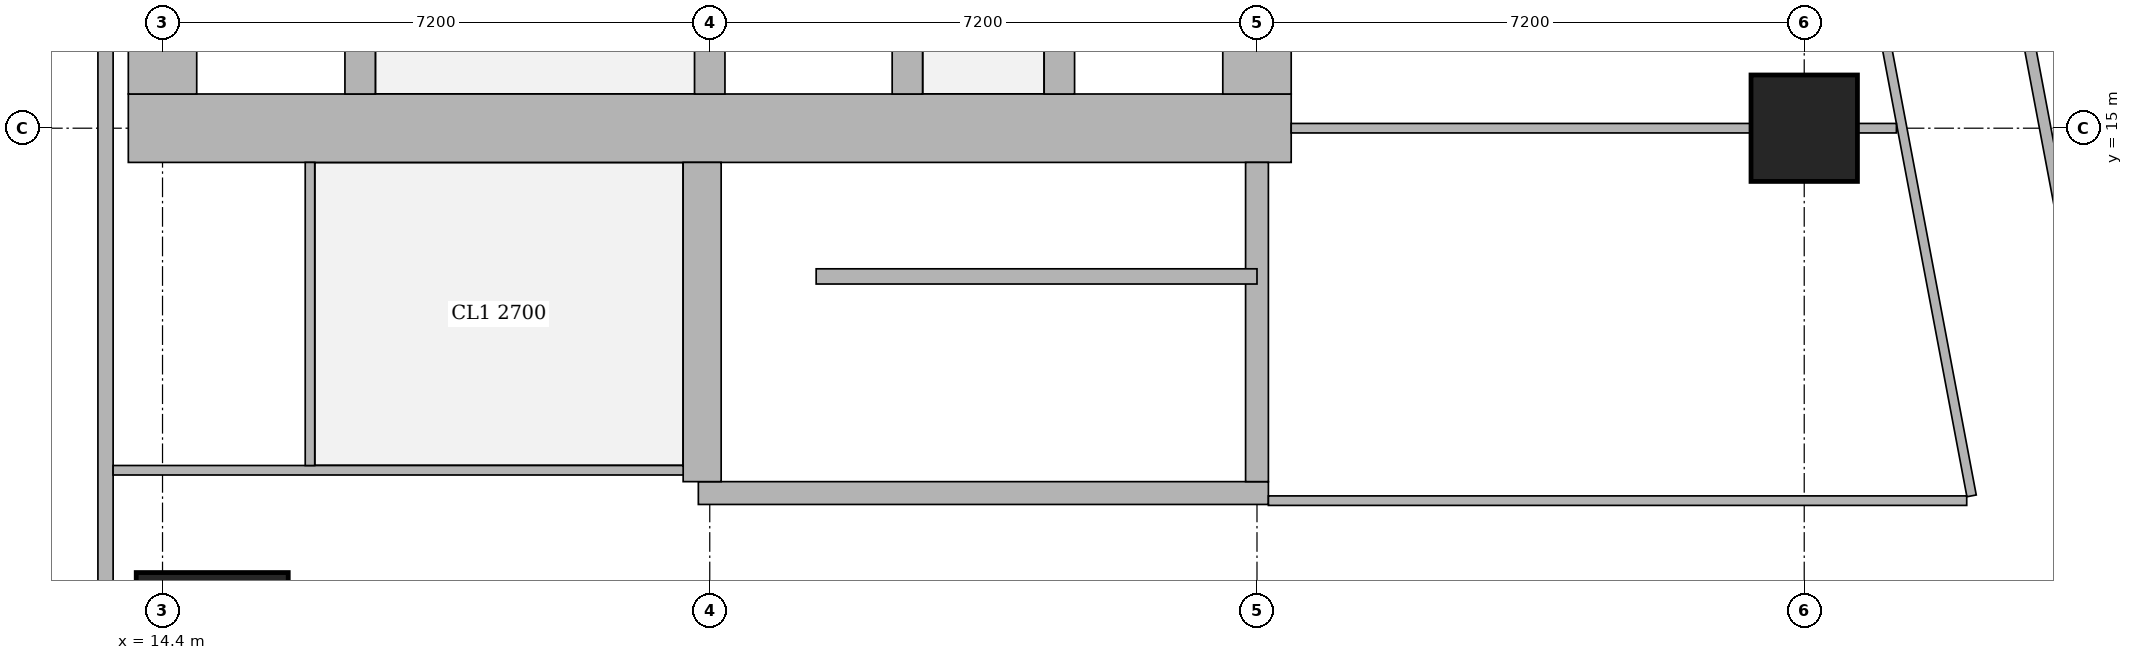
"""IFC4 building model, lengths in metres.
Left out: names, types, materials, properties, quantities, classifications, styles, units other than length and angle.
Written with IfcOpenShell. Run it as: python <this file> out.ifc"""

import sys

from ifc_helpers import new_model, si_unit, direction, frame, frame_2d, origin, origin_2d, place, context, subcontext, project, spatial, rectangle, extrude, element, fill, save


model = new_model("IFC4")
c1 = context("Model", 3, precision=1e-05, world=origin(), true_north=direction((0.0, 1.0)))
c2 = subcontext(c1, "Body", "Model", "MODEL_VIEW")
j1 = project(units=[si_unit("LENGTHUNIT", "METRE"), si_unit("PLANEANGLEUNIT", "RADIAN")], contexts=[c1])
p1 = place(None, origin())
s1 = spatial("IfcSite", under=j1, at=p1, CompositionType="ELEMENT")
p2 = place(p1, origin())
s2 = spatial("IfcBuilding", under=s1, at=p2, CompositionType="ELEMENT")
p3 = place(p2, frame((0.0, 0.0, 262.85)))
s3 = spatial("IfcBuildingStorey", under=s2, at=p3, CompositionType="ELEMENT", Elevation=262.85)
p4 = place(p3, frame((15.054, 8.154, 0.0), z_axis=(0.0, 0.0, 1.0), x_axis=(1.0, 0.0, 0.0)))
e1 = element("IfcColumn", 1, at=p4, inside=s3, PredefinedType="COLUMN", context=c2, shape_type="SweptSolid", body=[
    extrude(rectangle(XDim=2.0, YDim=2.0, at=origin_2d()), origin(), (0.0, 0.0, 1.0), 3.75),
])
p5 = place(p3, frame((36.0, 15.0, 0.0), z_axis=(0.0, 0.0, 1.0), x_axis=(1.0, 0.0, 0.0)))
e2 = element("IfcColumn", 2, at=p5, inside=s3, PredefinedType="COLUMN", context=c2, shape_type="SweptSolid", body=[
    extrude(rectangle(XDim=1.4, YDim=1.4, at=origin_2d()), origin(), (0.0, 0.0, 1.0), 3.75),
])
p6 = place(p3, frame((13.95, 15.0, 0.0), z_axis=(0.0, 0.0, 1.0), x_axis=(1.0, 0.0, 0.0)))
e3 = element("IfcWall", 3, at=p6, inside=s3, PredefinedType="SHEAR", context=c2, shape_type="SweptSolid", body=[
    extrude(rectangle(XDim=15.3, YDim=0.9, at=frame_2d((7.65, 0.0))), origin(), (0.0, 0.0, 1.0), 3.75),
])
p7 = place(p6, frame((4.45, 0.0, 0.0)))
e4 = element("IfcOpeningElement", 4, at=p7, cuts=e3, PredefinedType="OPENING", context=c2, shape_type="SweptSolid", body=[
    extrude(rectangle(XDim=1.8, YDim=2.1, at=frame_2d((0.9, 1.05))), frame((0.0, 0.46, 0.0), z_axis=(0.0, -1.0, 0.0), x_axis=(1.0, 0.0, 0.0)), (0.0, 0.0, 1.0), 0.92),
])
p8 = place(p6, frame((10.7, 0.0, 0.0)))
e5 = element("IfcOpeningElement", 5, at=p8, cuts=e3, PredefinedType="OPENING", context=c2, shape_type="SweptSolid", body=[
    extrude(rectangle(XDim=1.1, YDim=2.1, at=frame_2d((0.55, 1.05))), frame((0.0, 0.46, 0.0), z_axis=(0.0, -1.0, 0.0), x_axis=(1.0, 0.0, 0.0)), (0.0, 0.0, 1.0), 0.92),
])
for number, where, z_axis, x_axis in (
    (6, (14.4, 15.45, 0.0), (0.0, 0.0, 1.0), (0.0, 1.0, 0.0)),
    (7, (28.8, 15.45, 0.0), (0.0, 0.0, 1.0), (0.0, 1.0, 0.0)),
):
    element("IfcWall", number, at=place(p3, frame(where, z_axis=z_axis, x_axis=x_axis)), inside=s3, PredefinedType="SHEAR", context=c2, shape_type="SweptSolid", body=[
        extrude(rectangle(XDim=14.1, YDim=0.9, at=frame_2d((7.05, 0.0))), origin(), (0.0, 0.0, 1.0), 3.75),
    ])
p9 = place(p3, frame((17.0, 15.45, 0.0), z_axis=(0.0, 0.0, 1.0), x_axis=(0.0, 1.0, 0.0)))
e8 = element("IfcWall", 8, at=p9, inside=s3, PredefinedType="SHEAR", context=c2, shape_type="SweptSolid", body=[
    extrude(rectangle(XDim=14.1, YDim=0.4, at=frame_2d((7.05, 0.0))), origin(), (0.0, 0.0, 1.0), 3.75),
])
p10 = place(p9, frame((1.05, 0.0, 0.0)))
e9 = element("IfcOpeningElement", 9, at=p10, cuts=e8, PredefinedType="OPENING", context=c2, shape_type="SweptSolid", body=[
    extrude(rectangle(XDim=1.0, YDim=2.1, at=frame_2d((0.5, 1.05))), frame((0.0, 0.21, 0.0), z_axis=(0.0, -1.0, 0.0), x_axis=(1.0, 0.0, 0.0)), (0.0, 0.0, 1.0), 0.42),
])
p11 = place(p9, frame((4.675, 0.0, 0.0)))
e10 = element("IfcOpeningElement", 10, at=p11, cuts=e8, PredefinedType="OPENING", context=c2, shape_type="SweptSolid", body=[
    extrude(rectangle(XDim=1.0, YDim=2.1, at=frame_2d((0.5, 1.05))), frame((0.0, 0.21, 0.0), z_axis=(0.0, -1.0, 0.0), x_axis=(1.0, 0.0, 0.0)), (0.0, 0.0, 1.0), 0.42),
])
p12 = place(p9, frame((8.425, 0.0, 0.0)))
e11 = element("IfcOpeningElement", 11, at=p12, cuts=e8, PredefinedType="OPENING", context=c2, shape_type="SweptSolid", body=[
    extrude(rectangle(XDim=1.0, YDim=2.1, at=frame_2d((0.5, 1.05))), frame((0.0, 0.21, 0.0), z_axis=(0.0, -1.0, 0.0), x_axis=(1.0, 0.0, 0.0)), (0.0, 0.0, 1.0), 0.42),
])
p13 = place(p9, frame((12.175, 0.0, 0.0)))
e12 = element("IfcOpeningElement", 12, at=p13, cuts=e8, PredefinedType="OPENING", context=c2, shape_type="SweptSolid", body=[
    extrude(rectangle(XDim=1.0, YDim=2.1, at=frame_2d((0.5, 1.05))), frame((0.0, 0.21, 0.0), z_axis=(0.0, -1.0, 0.0), x_axis=(1.0, 0.0, 0.0)), (0.0, 0.0, 1.0), 0.42),
])
p14 = place(p3, frame((21.6, 15.45, 0.0), z_axis=(0.0, 0.0, 1.0), x_axis=(0.0, 1.0, 0.0)))
e13 = element("IfcWall", 13, at=p14, inside=s3, PredefinedType="SHEAR", context=c2, shape_type="SweptSolid", body=[
    extrude(rectangle(XDim=14.1, YDim=0.4, at=frame_2d((7.05, 0.0))), origin(), (0.0, 0.0, 1.0), 3.75),
])
p15 = place(p14, frame((0.875, 0.0, 0.0)))
e14 = element("IfcOpeningElement", 14, at=p15, cuts=e13, PredefinedType="OPENING", context=c2, shape_type="SweptSolid", body=[
    extrude(rectangle(XDim=1.1, YDim=2.1, at=frame_2d((0.55, 1.05))), frame((0.0, 0.21, 0.0), z_axis=(0.0, -1.0, 0.0), x_axis=(1.0, 0.0, 0.0)), (0.0, 0.0, 1.0), 0.42),
])
p16 = place(p14, frame((4.625, 0.0, 0.0)))
e15 = element("IfcOpeningElement", 15, at=p16, cuts=e13, PredefinedType="OPENING", context=c2, shape_type="SweptSolid", body=[
    extrude(rectangle(XDim=1.1, YDim=2.1, at=frame_2d((0.55, 1.05))), frame((0.0, 0.21, 0.0), z_axis=(0.0, -1.0, 0.0), x_axis=(1.0, 0.0, 0.0)), (0.0, 0.0, 1.0), 0.42),
])
p17 = place(p14, frame((8.375, 0.0, 0.0)))
e16 = element("IfcOpeningElement", 16, at=p17, cuts=e13, PredefinedType="OPENING", context=c2, shape_type="SweptSolid", body=[
    extrude(rectangle(XDim=1.1, YDim=2.1, at=frame_2d((0.55, 1.05))), frame((0.0, 0.21, 0.0), z_axis=(0.0, -1.0, 0.0), x_axis=(1.0, 0.0, 0.0)), (0.0, 0.0, 1.0), 0.42),
])
p18 = place(p14, frame((12.125, 0.0, 0.0)))
e17 = element("IfcOpeningElement", 17, at=p18, cuts=e13, PredefinedType="OPENING", context=c2, shape_type="SweptSolid", body=[
    extrude(rectangle(XDim=1.1, YDim=2.1, at=frame_2d((0.55, 1.05))), frame((0.0, 0.21, 0.0), z_axis=(0.0, -1.0, 0.0), x_axis=(1.0, 0.0, 0.0)), (0.0, 0.0, 1.0), 0.42),
])
p19 = place(p3, frame((24.2, 15.45, 0.0), z_axis=(0.0, 0.0, 1.0), x_axis=(0.0, 1.0, 0.0)))
e18 = element("IfcWall", 18, at=p19, inside=s3, PredefinedType="SHEAR", context=c2, shape_type="SweptSolid", body=[
    extrude(rectangle(XDim=14.1, YDim=0.4, at=frame_2d((7.05, 0.0))), origin(), (0.0, 0.0, 1.0), 3.75),
])
p20 = place(p3, frame((26.2, 15.45, 0.0), z_axis=(0.0, 0.0, 1.0), x_axis=(0.0, 1.0, 0.0)))
e19 = element("IfcWall", 19, at=p20, inside=s3, PredefinedType="SHEAR", context=c2, shape_type="SweptSolid", body=[
    extrude(rectangle(XDim=3.1, YDim=0.4, at=frame_2d((1.55, 0.0))), origin(), (0.0, 0.0, 1.0), 3.75),
])
p21 = place(p20, frame((0.825, 0.0, 0.0)))
e20 = element("IfcOpeningElement", 20, at=p21, cuts=e19, PredefinedType="OPENING", context=c2, shape_type="SweptSolid", body=[
    extrude(rectangle(XDim=1.2, YDim=2.1, at=frame_2d((0.6, 1.05))), frame((0.0, 0.21, 0.0), z_axis=(0.0, -1.0, 0.0), x_axis=(1.0, 0.0, 0.0)), (0.0, 0.0, 1.0), 0.42),
])
p22 = place(p3, frame((21.45, 10.2, 0.0), z_axis=(0.0, 0.0, 1.0), x_axis=(1.0, 0.0, 0.0)))
e21 = element("IfcWall", 21, at=p22, inside=s3, PredefinedType="SHEAR", context=c2, shape_type="SweptSolid", body=[
    extrude(rectangle(XDim=7.5, YDim=0.3, at=frame_2d((3.75, 0.0))), origin(), (0.0, 0.0, 1.0), 3.75),
])
p23 = place(p22, frame((1.2, 0.0, 0.0)))
e22 = element("IfcOpeningElement", 22, at=p23, cuts=e21, PredefinedType="OPENING", context=c2, shape_type="SweptSolid", body=[
    extrude(rectangle(XDim=1.1, YDim=2.1, at=frame_2d((0.55, 1.05))), frame((0.0, 0.16, 0.0), z_axis=(0.0, -1.0, 0.0), x_axis=(1.0, 0.0, 0.0)), (0.0, 0.0, 1.0), 0.32),
])
p24 = place(p3, frame((21.5, 10.35, 0.0), z_axis=(0.0, 0.0, 1.0), x_axis=(0.0, 1.0, 0.0)))
e23 = element("IfcWall", 23, at=p24, inside=s3, PredefinedType="SHEAR", context=c2, shape_type="SweptSolid", body=[
    extrude(rectangle(XDim=4.2, YDim=0.5, at=frame_2d((2.1, 0.0))), origin(), (0.0, 0.0, 1.0), 3.75),
])
p25 = place(p3, frame((28.8, 10.35, 0.0), z_axis=(0.0, 0.0, 1.0), x_axis=(0.0, 1.0, 0.0)))
e24 = element("IfcWall", 24, at=p25, inside=s3, PredefinedType="SHEAR", context=c2, shape_type="SweptSolid", body=[
    extrude(rectangle(XDim=4.2, YDim=0.3, at=frame_2d((2.1, 0.0))), origin(), (0.0, 0.0, 1.0), 3.75),
])
p26 = place(p3, frame((13.65, 43.037, 0.0), z_axis=(0.0, 0.0, 1.0), x_axis=(0.0, -1.0, 0.0)))
e25 = element("IfcWall", 25, at=p26, inside=s3, PredefinedType="SOLIDWALL", context=c2, shape_type="SweptSolid", body=[
    extrude(rectangle(XDim=35.374, YDim=0.2, at=frame_2d((17.687, 0.0))), origin(), (0.0, 0.0, 1.0), 3.5),
])
p27 = place(p26, frame((1.959, 0.0, 0.9)))
e26 = element("IfcOpeningElement", 26, at=p27, cuts=e25, PredefinedType="OPENING", context=c2, shape_type="SweptSolid", body=[
    extrude(rectangle(XDim=1.8, YDim=1.5, at=frame_2d((0.9, 0.75))), frame((0.0, 0.11, 0.0), z_axis=(0.0, -1.0, 0.0), x_axis=(1.0, 0.0, 0.0)), (0.0, 0.0, 1.0), 0.22),
])
p28 = place(p3, frame((34.036, 42.186, 0.0), z_axis=(0.0, 0.0, 1.0), x_axis=(0.185593518645, -0.9826266055, 0.0)))
e27 = element("IfcWall", 27, at=p28, inside=s3, PredefinedType="SOLIDWALL", context=c2, shape_type="SweptSolid", body=[
    extrude(rectangle(XDim=35.961, YDim=0.15, at=frame_2d((17.98, 0.0))), origin(), (0.0, 0.0, 1.0), 2.5),
])
p29 = place(p28, frame((15.529, 0.0, 0.0)))
e28 = element("IfcOpeningElement", 28, at=p29, cuts=e27, PredefinedType="OPENING", context=c2, shape_type="SweptSolid", body=[
    extrude(rectangle(XDim=1.0, YDim=2.1, at=frame_2d((0.5, 1.05))), frame((0.0, 0.085, 0.0), z_axis=(0.0, -1.0, 0.0), x_axis=(1.0, 0.0, 0.0)), (0.0, 0.0, 1.0), 0.17),
])
p30 = place(p28, frame((19.345, 0.0, 0.0)))
e29 = element("IfcOpeningElement", 29, at=p30, cuts=e27, PredefinedType="OPENING", context=c2, shape_type="SweptSolid", body=[
    extrude(rectangle(XDim=1.0, YDim=2.1, at=frame_2d((0.5, 1.05))), frame((0.0, 0.085, 0.0), z_axis=(0.0, -1.0, 0.0), x_axis=(1.0, 0.0, 0.0)), (0.0, 0.0, 1.0), 0.17),
])
p31 = place(p28, frame((30.594, 0.0, 0.0)))
e30 = element("IfcOpeningElement", 30, at=p31, cuts=e27, PredefinedType="OPENING", context=c2, shape_type="SweptSolid", body=[
    extrude(rectangle(XDim=1.0, YDim=2.1, at=frame_2d((0.5, 1.05))), frame((0.0, 0.085, 0.0), z_axis=(0.0, -1.0, 0.0), x_axis=(1.0, 0.0, 0.0)), (0.0, 0.0, 1.0), 0.17),
])
p32 = place(p3, frame((13.75, 10.5, 0.0), z_axis=(0.0, 0.0, 1.0), x_axis=(1.0, 0.0, 0.0)))
e31 = element("IfcWall", 31, at=p32, inside=s3, PredefinedType="PARTITIONING", context=c2, shape_type="SweptSolid", body=[
    extrude(rectangle(XDim=7.5, YDim=0.125, at=frame_2d((3.75, 0.0))), origin(), (0.0, 0.0, 1.0), 3.5),
])
p33 = place(p32, frame((4.245, 0.0, 0.0)))
e32 = element("IfcOpeningElement", 32, at=p33, cuts=e31, PredefinedType="OPENING", context=c2, shape_type="SweptSolid", body=[
    extrude(rectangle(XDim=1.8, YDim=2.1, at=frame_2d((0.9, 1.05))), frame((0.0, 0.073, 0.0), z_axis=(0.0, -1.0, 0.0), x_axis=(1.0, 0.0, 0.0)), (0.0, 0.0, 1.0), 0.145),
])
p34 = place(p3, frame((16.34, 10.562, 0.0), z_axis=(0.0, 0.0, 1.0), x_axis=(0.0, 1.0, 0.0)))
e33 = element("IfcWall", 33, at=p34, inside=s3, PredefinedType="PARTITIONING", context=c2, shape_type="SweptSolid", body=[
    extrude(rectangle(XDim=3.988, YDim=0.125, at=frame_2d((1.994, 0.0))), origin(), (0.0, 0.0, 1.0), 3.5),
])
p35 = place(p34, frame((1.438, 0.0, 0.0)))
e34 = element("IfcOpeningElement", 34, at=p35, cuts=e33, PredefinedType="OPENING", context=c2, shape_type="SweptSolid", body=[
    extrude(rectangle(XDim=1.0, YDim=2.1, at=frame_2d((0.5, 1.05))), frame((0.0, 0.073, 0.0), z_axis=(0.0, -1.0, 0.0), x_axis=(1.0, 0.0, 0.0)), (0.0, 0.0, 1.0), 0.145),
])
p36 = place(p3, frame((28.95, 10.1, 0.0), z_axis=(0.0, 0.0, 1.0), x_axis=(1.0, 0.0, 0.0)))
e35 = element("IfcWall", 35, at=p36, inside=s3, PredefinedType="PARTITIONING", context=c2, shape_type="SweptSolid", body=[
    extrude(rectangle(XDim=9.188, YDim=0.125, at=frame_2d((4.594, 0.0))), origin(), (0.0, 0.0, 1.0), 3.5),
])
p37 = place(p3, frame((38.202, 10.163, 0.0), z_axis=(0.0, 0.0, 1.0), x_axis=(-0.185610321132, 0.982623431783, 0.0)))
e36 = element("IfcWall", 36, at=p37, inside=s3, PredefinedType="PARTITIONING", context=c2, shape_type="SweptSolid", body=[
    extrude(rectangle(XDim=25.111, YDim=0.125, at=frame_2d((12.556, 0.0))), origin(), (0.0, 0.0, 1.0), 2.5),
])
p38 = place(p37, frame((0.708, 0.0, 0.0)))
e37 = element("IfcOpeningElement", 37, at=p38, cuts=e36, PredefinedType="OPENING", context=c2, shape_type="SweptSolid", body=[
    extrude(rectangle(XDim=1.0, YDim=2.1, at=frame_2d((0.5, 1.05))), frame((0.0, 0.073, 0.0), z_axis=(0.0, -1.0, 0.0), x_axis=(1.0, 0.0, 0.0)), (0.0, 0.0, 1.0), 0.145),
])
p39 = place(p37, frame((5.9, 0.0, 0.0)))
e38 = element("IfcOpeningElement", 38, at=p39, cuts=e36, PredefinedType="OPENING", context=c2, shape_type="SweptSolid", body=[
    extrude(rectangle(XDim=1.0, YDim=2.1, at=frame_2d((0.5, 1.05))), frame((0.0, 0.073, 0.0), z_axis=(0.0, -1.0, 0.0), x_axis=(1.0, 0.0, 0.0)), (0.0, 0.0, 1.0), 0.145),
])
p40 = place(p37, frame((13.378, 0.0, 0.0)))
e39 = element("IfcOpeningElement", 39, at=p40, cuts=e36, PredefinedType="OPENING", context=c2, shape_type="SweptSolid", body=[
    extrude(rectangle(XDim=1.0, YDim=2.1, at=frame_2d((0.5, 1.05))), frame((0.0, 0.073, 0.0), z_axis=(0.0, -1.0, 0.0), x_axis=(1.0, 0.0, 0.0)), (0.0, 0.0, 1.0), 0.145),
])
p41 = place(p37, frame((17.194, 0.0, 0.0)))
e40 = element("IfcOpeningElement", 40, at=p41, cuts=e36, PredefinedType="OPENING", context=c2, shape_type="SweptSolid", body=[
    extrude(rectangle(XDim=1.0, YDim=2.1, at=frame_2d((0.5, 1.05))), frame((0.0, 0.073, 0.0), z_axis=(0.0, -1.0, 0.0), x_axis=(1.0, 0.0, 0.0)), (0.0, 0.0, 1.0), 0.145),
])
p42 = place(p37, frame((21.15, 0.0, 0.0)))
e41 = element("IfcOpeningElement", 41, at=p42, cuts=e36, PredefinedType="OPENING", context=c2, shape_type="SweptSolid", body=[
    extrude(rectangle(XDim=1.0, YDim=2.1, at=frame_2d((0.5, 1.05))), frame((0.0, 0.073, 0.0), z_axis=(0.0, -1.0, 0.0), x_axis=(1.0, 0.0, 0.0)), (0.0, 0.0, 1.0), 0.145),
])
p43 = place(p3, frame((29.25, 15.0, 0.0), z_axis=(0.0, 0.0, 1.0), x_axis=(1.0, 0.0, 0.0)))
e42 = element("IfcWall", 42, at=p43, inside=s3, PredefinedType="PARTITIONING", context=c2, shape_type="SweptSolid", body=[
    extrude(rectangle(XDim=6.049, YDim=0.125, at=frame_2d((3.024, 0.0))), origin(), (0.0, 0.0, 1.0), 3.5),
])
p44 = place(p3, frame((36.701, 15.0, 0.0), z_axis=(0.0, 0.0, 1.0), x_axis=(1.0, 0.0, 0.0)))
e43 = element("IfcWall", 43, at=p44, inside=s3, PredefinedType="PARTITIONING", context=c2, shape_type="SweptSolid", body=[
    extrude(rectangle(XDim=0.512, YDim=0.125, at=frame_2d((0.256, 0.0))), origin(), (0.0, 0.0, 1.0), 3.5),
])
p45 = place(p3, frame((23.0, 13.05, 0.0), z_axis=(0.0, 0.0, 1.0), x_axis=(1.0, 0.0, 0.0)))
e44 = element("IfcWall", 44, at=p45, inside=s3, PredefinedType="SHEAR", context=c2, shape_type="SweptSolid", body=[
    extrude(rectangle(XDim=5.8, YDim=0.2, at=frame_2d((2.9, 0.0))), origin(), (0.0, 0.0, 1.0), 3.75),
])
p46 = place(p35, origin())
e45 = element("IfcDoor", 45, at=p46, inside=s3, OperationType="SINGLE_SWING_LEFT", PredefinedType="DOOR", context=c2, shape_type="SweptSolid", body=[
    extrude(rectangle(XDim=1.0, YDim=2.1, at=frame_2d((0.5, 1.05))), frame((0.0, 0.025, 0.0), z_axis=(0.0, -1.0, 0.0), x_axis=(1.0, 0.0, 0.0)), (0.0, 0.0, 1.0), 0.05),
])
fill(e34, e45)
p47 = place(p33, origin())
e46 = element("IfcDoor", 46, at=p47, inside=s3, OperationType="DOUBLE_DOOR_SINGLE_SWING", PredefinedType="DOOR", context=c2, shape_type="SweptSolid", body=[
    extrude(rectangle(XDim=1.8, YDim=2.1, at=frame_2d((0.9, 1.05))), frame((0.0, 0.025, 0.0), z_axis=(0.0, -1.0, 0.0), x_axis=(1.0, 0.0, 0.0)), (0.0, 0.0, 1.0), 0.05),
])
fill(e32, e46)
p48 = place(p38, origin())
e47 = element("IfcDoor", 47, at=p48, inside=s3, OperationType="SINGLE_SWING_LEFT", PredefinedType="DOOR", context=c2, shape_type="SweptSolid", body=[
    extrude(rectangle(XDim=1.0, YDim=2.1, at=frame_2d((0.5, 1.05))), frame((0.0, 0.025, 0.0), z_axis=(0.0, -1.0, 0.0), x_axis=(1.0, 0.0, 0.0)), (0.0, 0.0, 1.0), 0.05),
])
fill(e37, e47)
p49 = place(p39, origin())
e48 = element("IfcDoor", 48, at=p49, inside=s3, OperationType="SINGLE_SWING_LEFT", PredefinedType="DOOR", context=c2, shape_type="SweptSolid", body=[
    extrude(rectangle(XDim=1.0, YDim=2.1, at=frame_2d((0.5, 1.05))), frame((0.0, 0.025, 0.0), z_axis=(0.0, -1.0, 0.0), x_axis=(1.0, 0.0, 0.0)), (0.0, 0.0, 1.0), 0.05),
])
fill(e38, e48)
p50 = place(p7, origin())
e49 = element("IfcDoor", 49, at=p50, inside=s3, OperationType="DOUBLE_DOOR_SINGLE_SWING", PredefinedType="DOOR", context=c2, shape_type="SweptSolid", body=[
    extrude(rectangle(XDim=1.8, YDim=2.1, at=frame_2d((0.9, 1.05))), frame((0.0, 0.025, 0.0), z_axis=(0.0, -1.0, 0.0), x_axis=(1.0, 0.0, 0.0)), (0.0, 0.0, 1.0), 0.05),
])
fill(e4, e49)
p51 = place(p8, origin())
e50 = element("IfcDoor", 50, at=p51, inside=s3, OperationType="SINGLE_SWING_LEFT", PredefinedType="DOOR", context=c2, shape_type="SweptSolid", body=[
    extrude(rectangle(XDim=1.1, YDim=2.1, at=frame_2d((0.55, 1.05))), frame((0.0, 0.025, 0.0), z_axis=(0.0, -1.0, 0.0), x_axis=(1.0, 0.0, 0.0)), (0.0, 0.0, 1.0), 0.05),
])
fill(e5, e50)
p52 = place(p23, origin())
e51 = element("IfcDoor", 51, at=p52, inside=s3, OperationType="SINGLE_SWING_LEFT", PredefinedType="DOOR", context=c2, shape_type="SweptSolid", body=[
    extrude(rectangle(XDim=1.1, YDim=2.1, at=frame_2d((0.55, 1.05))), frame((0.0, 0.025, 0.0), z_axis=(0.0, -1.0, 0.0), x_axis=(1.0, 0.0, 0.0)), (0.0, 0.0, 1.0), 0.05),
])
fill(e22, e51)
save(model, sys.argv[1])
